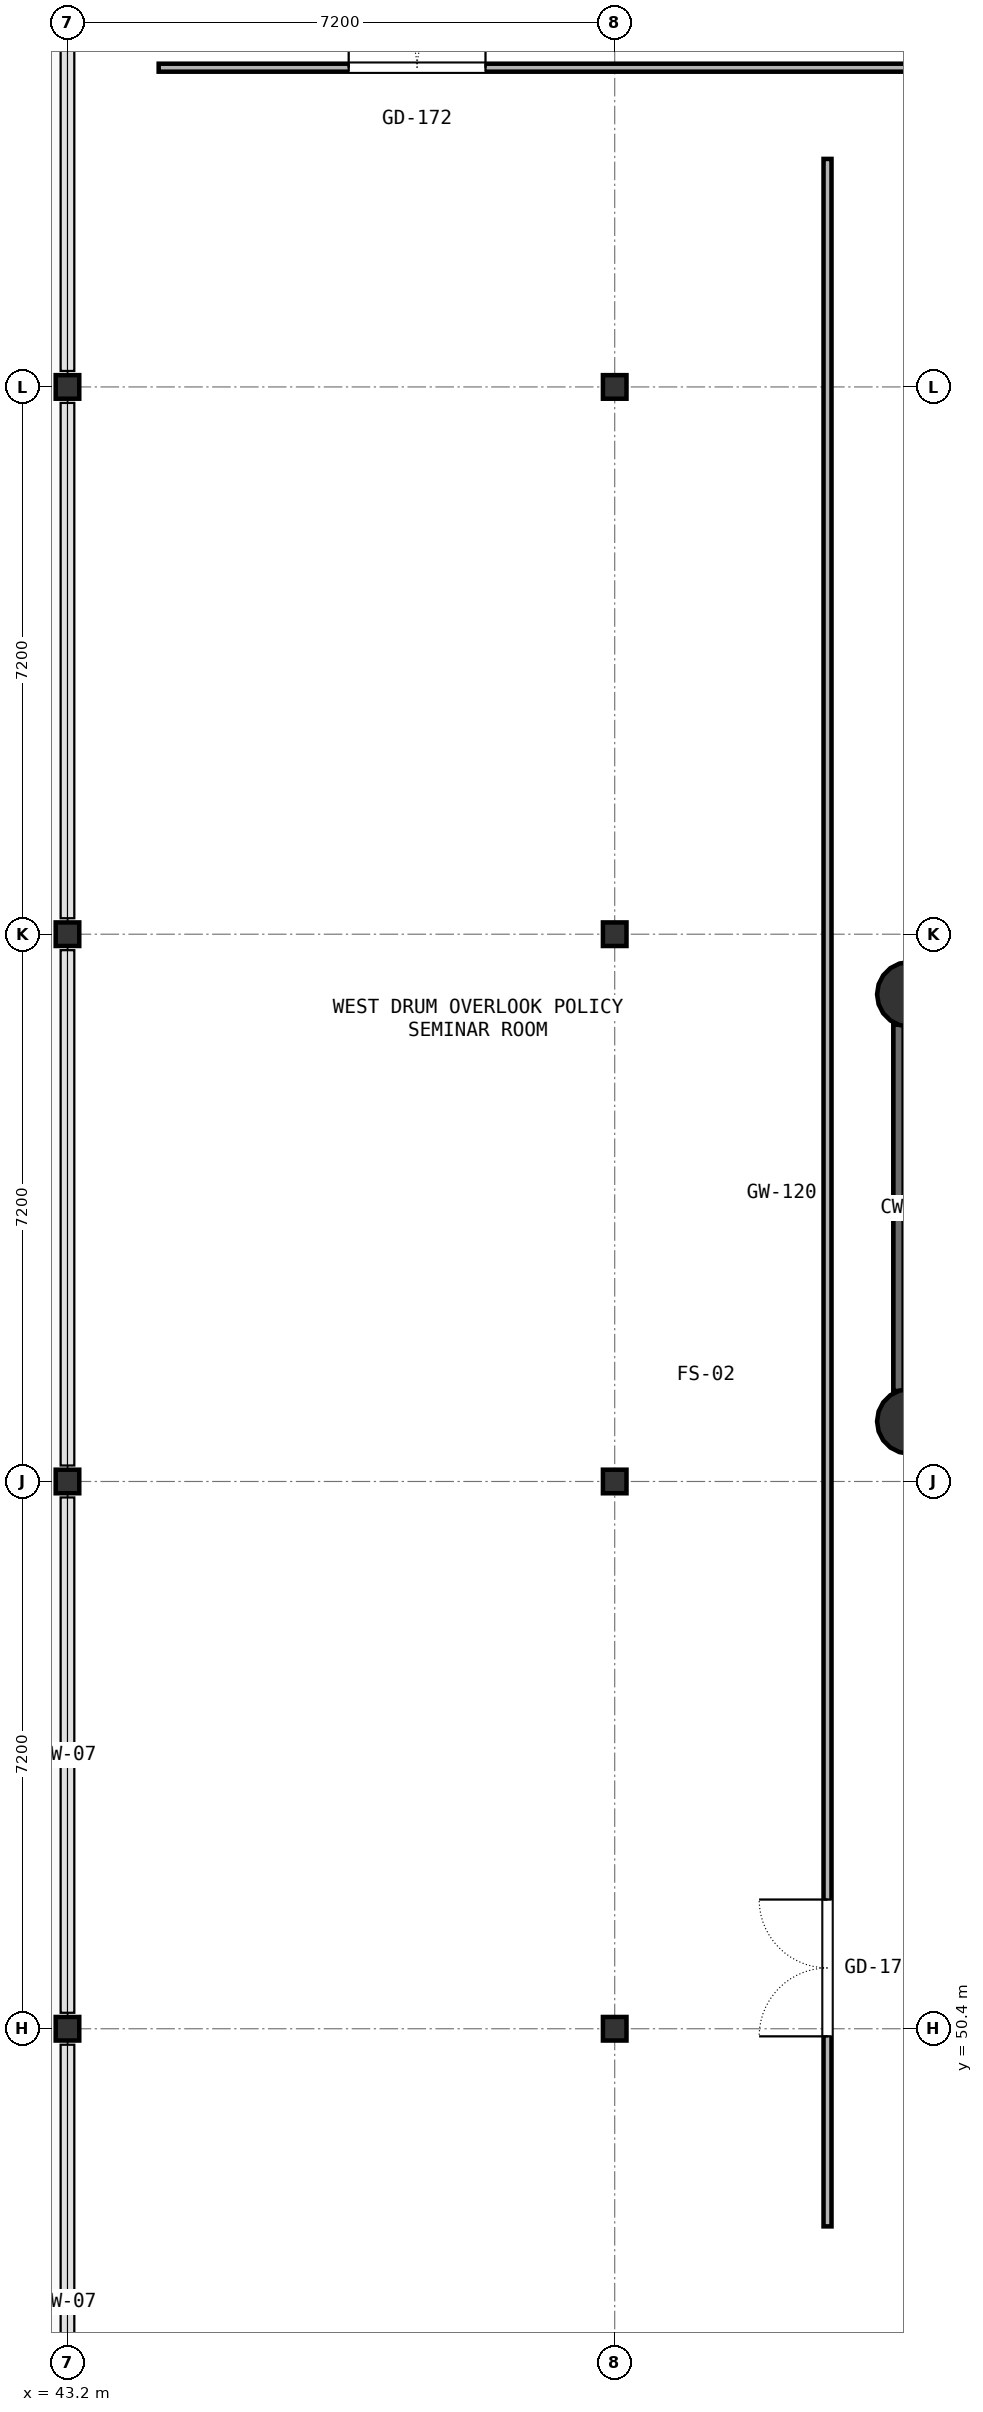
"""IFC4 building model, lengths in metres.
Left out: names, types, materials, properties, quantities, classifications, styles, units other than length and angle.
Written with IfcOpenShell. Run it as: python <this file> out.ifc"""

import sys

from ifc_helpers import new_model, si_unit, direction, frame, frame_2d, origin, origin_2d, place, context, subcontext, project, spatial, rectangle, hollow_rectangle, circle, extrude, element, fill, save


model = new_model("IFC4")
c1 = context("Model", 3, precision=1e-05, world=origin(), true_north=direction((0.0, 1.0)))
c2 = subcontext(c1, "Body", "Model", "MODEL_VIEW")
j1 = project(units=[si_unit("LENGTHUNIT", "METRE"), si_unit("PLANEANGLEUNIT", "RADIAN")], contexts=[c1])
p1 = place(None, origin())
s1 = spatial("IfcSite", under=j1, at=p1, CompositionType="ELEMENT")
p2 = place(p1, origin())
s2 = spatial("IfcBuilding", under=s1, at=p2, CompositionType="ELEMENT")
p3 = place(p2, frame((0.0, 0.0, 14.4)))
s3 = spatial("IfcBuildingStorey", under=s2, at=p3, CompositionType="ELEMENT", Elevation=14.4)
for number, where, z_axis, x_axis in (
    (1, (54.277, 64.009, 0.0), (0.0, 0.0, 1.0), (1.0, 0.0, 0.0)),
    (2, (54.277, 58.391, 0.0), (0.0, 0.0, 1.0), (1.0, 0.0, 0.0)),
):
    element("IfcColumn", number, at=place(p3, frame(where, z_axis=z_axis, x_axis=x_axis)), inside=s3, PredefinedType="COLUMN", context=c2, shape_type="SweptSolid", body=[
        extrude(circle(Radius=0.425, at=origin_2d()), origin(), (0.0, 0.0, 1.0), 4.2),
    ])
for number, where, z_axis, x_axis in (
    (3, (43.2, 50.4, 0.0), (0.0, 0.0, 1.0), (1.0, 0.0, 0.0)),
    (4, (43.2, 57.6, 0.0), (0.0, 0.0, 1.0), (1.0, 0.0, 0.0)),
    (5, (43.2, 64.8, 0.0), (0.0, 0.0, 1.0), (1.0, 0.0, 0.0)),
    (6, (43.2, 72.0, 0.0), (0.0, 0.0, 1.0), (1.0, 0.0, 0.0)),
    (7, (50.4, 50.4, 0.0), (0.0, 0.0, 1.0), (1.0, 0.0, 0.0)),
    (8, (50.4, 57.6, 0.0), (0.0, 0.0, 1.0), (1.0, 0.0, 0.0)),
    (9, (50.4, 64.8, 0.0), (0.0, 0.0, 1.0), (1.0, 0.0, 0.0)),
    (10, (50.4, 72.0, 0.0), (0.0, 0.0, 1.0), (1.0, 0.0, 0.0)),
):
    element("IfcColumn", number, at=place(p3, frame(where, z_axis=z_axis, x_axis=x_axis)), inside=s3, PredefinedType="COLUMN", context=c2, shape_type="SweptSolid", body=[
        extrude(hollow_rectangle(XDim=0.31, YDim=0.31, WallThickness=0.012, InnerFilletRadius=0.012, OuterFilletRadius=0.024, at=origin_2d()), origin(), (0.0, 0.0, 1.0), 4.2),
    ])
p4 = place(p3, frame((54.277, 58.791, 0.0), z_axis=(0.0, 0.0, 1.0), x_axis=(0.0, 1.0, 0.0)))
e11 = element("IfcWall", 11, at=p4, inside=s3, PredefinedType="SHEAR", context=c2, shape_type="SweptSolid", body=[
    extrude(rectangle(XDim=4.819, YDim=0.42, at=frame_2d((2.409, 0.0))), origin(), (0.0, 0.0, 1.0), 0.82),
])
p5 = place(p3, frame((54.277, 58.791, 2.88), z_axis=(0.0, 0.0, 1.0), x_axis=(0.0, 1.0, 0.0)))
e12 = element("IfcWall", 12, at=p5, inside=s3, PredefinedType="SHEAR", context=c2, shape_type="SweptSolid", body=[
    extrude(rectangle(XDim=4.819, YDim=0.42, at=frame_2d((2.409, 0.0))), origin(), (0.0, 0.0, 1.0), 1.32),
])
p6 = place(p3, frame((44.4, 76.2, 0.0), z_axis=(0.0, 0.0, 1.0), x_axis=(1.0, 0.0, 0.0)))
e13 = element("IfcWall", 13, at=p6, inside=s3, PredefinedType="PARTITIONING", context=c2, shape_type="SweptSolid", body=[
    extrude(rectangle(XDim=48.0, YDim=0.105, at=frame_2d((24.0, 0.0))), origin(), (0.0, 0.0, 1.0), 3.08),
])
p7 = place(p6, frame((2.5, 0.0, 0.0)))
e14 = element("IfcOpeningElement", 14, at=p7, cuts=e13, PredefinedType="OPENING", context=c2, shape_type="SweptSolid", body=[
    extrude(rectangle(XDim=1.8, YDim=2.2, at=frame_2d((0.9, 1.1))), frame((0.0, 0.062, 0.0), z_axis=(0.0, -1.0, 0.0), x_axis=(1.0, 0.0, 0.0)), (0.0, 0.0, 1.0), 0.125),
])
p8 = place(p3, frame((53.2, 47.8, 0.0), z_axis=(0.0, 0.0, 1.0), x_axis=(0.0, 1.0, 0.0)))
e15 = element("IfcWall", 15, at=p8, inside=s3, PredefinedType="PARTITIONING", context=c2, shape_type="SweptSolid", body=[
    extrude(rectangle(XDim=27.2, YDim=0.105, at=frame_2d((13.6, 0.0))), origin(), (0.0, 0.0, 1.0), 3.08),
])
p9 = place(p8, frame((2.5, 0.0, 0.0)))
e16 = element("IfcOpeningElement", 16, at=p9, cuts=e15, PredefinedType="OPENING", context=c2, shape_type="SweptSolid", body=[
    extrude(rectangle(XDim=1.8, YDim=2.2, at=frame_2d((0.9, 1.1))), frame((0.0, 0.062, 0.0), z_axis=(0.0, -1.0, 0.0), x_axis=(1.0, 0.0, 0.0)), (0.0, 0.0, 1.0), 0.125),
])
p10 = place(p7, origin())
e17 = element("IfcDoor", 17, at=p10, inside=s3, OperationType="DOUBLE_DOOR_SINGLE_SWING", PredefinedType="DOOR", context=c2, shape_type="SweptSolid", body=[
    extrude(rectangle(XDim=1.8, YDim=2.2, at=frame_2d((0.9, 1.1))), frame((0.0, 0.025, 0.0), z_axis=(0.0, -1.0, 0.0), x_axis=(1.0, 0.0, 0.0)), (0.0, 0.0, 1.0), 0.05),
])
fill(e14, e17)
p11 = place(p9, origin())
e18 = element("IfcDoor", 18, at=p11, inside=s3, OperationType="DOUBLE_DOOR_SINGLE_SWING", PredefinedType="DOOR", context=c2, shape_type="SweptSolid", body=[
    extrude(rectangle(XDim=1.8, YDim=2.2, at=frame_2d((0.9, 1.1))), frame((0.0, 0.025, 0.0), z_axis=(0.0, -1.0, 0.0), x_axis=(1.0, 0.0, 0.0)), (0.0, 0.0, 1.0), 0.05),
])
fill(e16, e18)
save(model, sys.argv[1])
